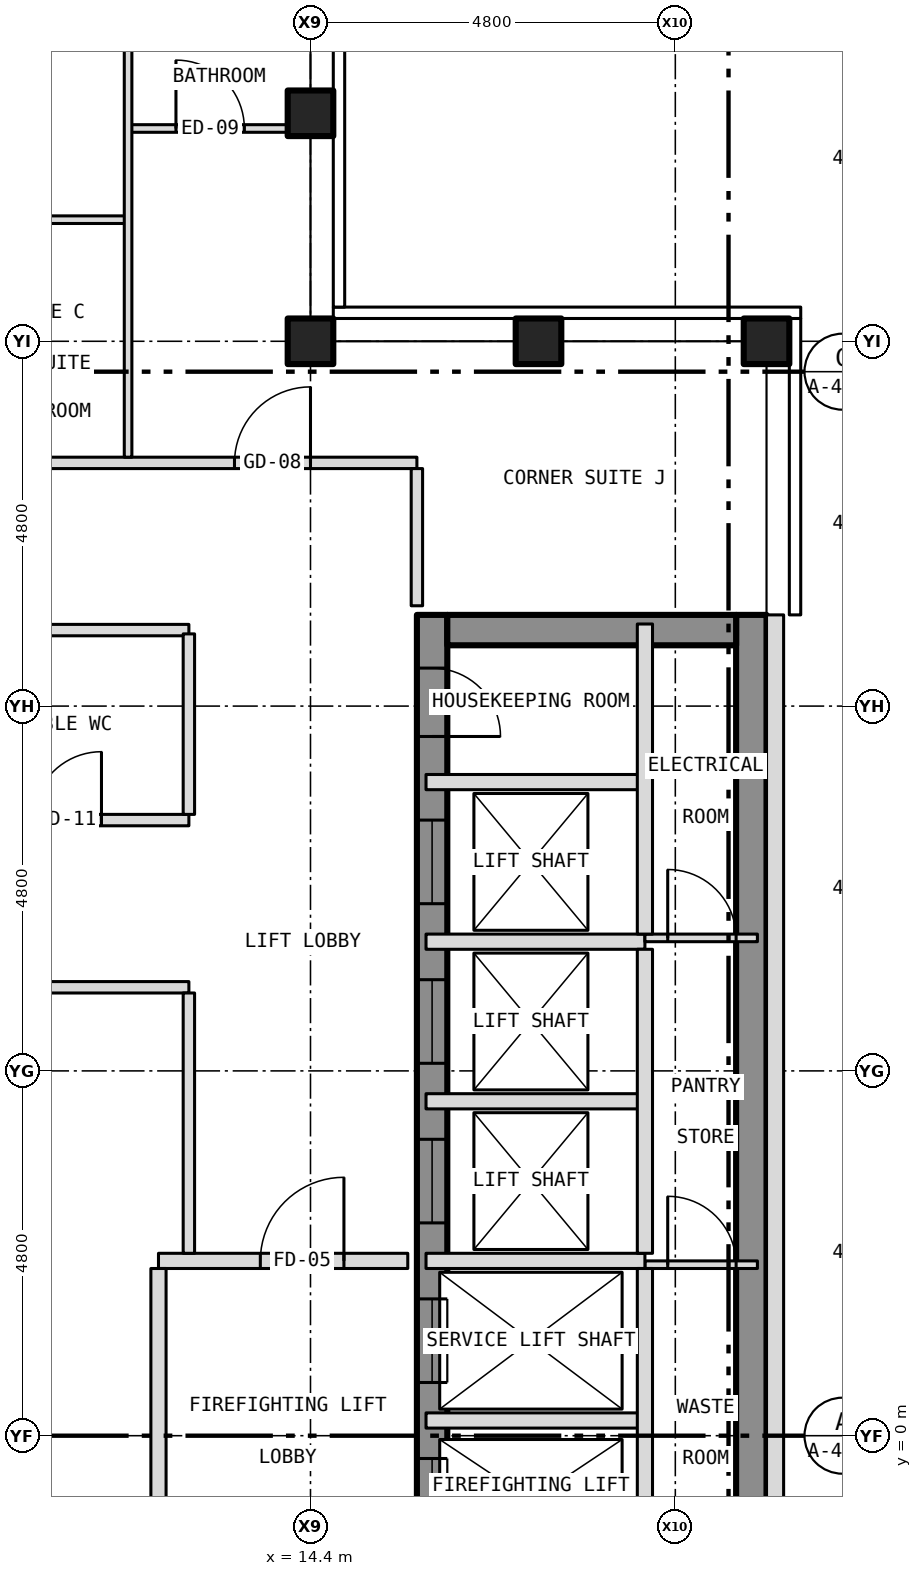
"""IFC4 building model, lengths in metres.
Left out: names, types, materials, properties, quantities, classifications, styles, units other than length and angle.
Written with IfcOpenShell. Run it as: python <this file> out.ifc"""

import sys

from ifc_helpers import new_model, si_unit, direction, frame, frame_2d, origin, origin_2d, place, context, subcontext, project, spatial, rectangle, hollow_rectangle, extrude, element, fill, save


model = new_model("IFC4")
c1 = context("Model", 3, precision=1e-05, world=origin(), true_north=direction((0.0, 1.0)))
c2 = subcontext(c1, "Body", "Model", "MODEL_VIEW")
j1 = project(units=[si_unit("LENGTHUNIT", "METRE"), si_unit("PLANEANGLEUNIT", "RADIAN")], contexts=[c1])
p1 = place(None, origin())
s1 = spatial("IfcSite", under=j1, at=p1, CompositionType="ELEMENT")
p2 = place(p1, origin())
s2 = spatial("IfcBuilding", under=s1, at=p2, CompositionType="ELEMENT")
p3 = place(p2, frame((0.0, 0.0, 251.5)))
s3 = spatial("IfcBuildingStorey", under=s2, at=p3, CompositionType="ELEMENT", Elevation=251.5)
for number, where, z_axis, x_axis in (
    (1, (20.4, 14.4, -0.15), (0.0, 0.0, 1.0), (1.0, 0.0, 0.0)),
    (2, (14.4, 14.4, -0.15), (0.0, 0.0, 1.0), (1.0, 0.0, 0.0)),
    (3, (14.4, 17.4, -0.15), (0.0, 0.0, 1.0), (1.0, 0.0, 0.0)),
    (4, (17.4, 14.4, -0.15), (0.0, 0.0, 1.0), (1.0, 0.0, 0.0)),
):
    element("IfcColumn", number, at=place(p3, frame(where, z_axis=z_axis, x_axis=x_axis)), inside=s3, PredefinedType="COLUMN", context=c2, shape_type="SweptSolid", body=[
        extrude(hollow_rectangle(XDim=0.6, YDim=0.6, WallThickness=0.03, at=origin_2d()), origin(), (0.0, 0.0, 1.0), 3.5),
    ])
p4 = place(p3, frame((16.0, -10.8, 0.0), z_axis=(0.0, 0.0, 1.0), x_axis=(0.0, 1.0, 0.0)))
e5 = element("IfcWall", 5, at=p4, inside=s3, PredefinedType="SHEAR", context=c2, shape_type="SweptSolid", body=[
    extrude(rectangle(XDim=21.6, YDim=0.4, at=frame_2d((10.8, 0.0))), origin(), (0.0, 0.0, 1.0), 3.25),
])
p5 = place(p4, frame((9.4, 0.0, 0.0)))
e6 = element("IfcOpeningElement", 6, at=p5, cuts=e5, PredefinedType="OPENING", context=c2, shape_type="SweptSolid", body=[
    extrude(rectangle(XDim=1.1, YDim=2.1, at=frame_2d((0.55, 1.05))), frame((0.0, 0.212, 0.0), z_axis=(0.0, -1.0, 0.0), x_axis=(1.0, 0.0, 0.0)), (0.0, 0.0, 1.0), 0.424),
])
p6 = place(p4, frame((11.5, 0.0, 0.0)))
e7 = element("IfcOpeningElement", 7, at=p6, cuts=e5, PredefinedType="OPENING", context=c2, shape_type="SweptSolid", body=[
    extrude(rectangle(XDim=1.1, YDim=2.1, at=frame_2d((0.55, 1.05))), frame((0.0, 0.212, 0.0), z_axis=(0.0, -1.0, 0.0), x_axis=(1.0, 0.0, 0.0)), (0.0, 0.0, 1.0), 0.424),
])
p7 = place(p4, frame((13.6, 0.0, 0.0)))
e8 = element("IfcOpeningElement", 8, at=p7, cuts=e5, PredefinedType="OPENING", context=c2, shape_type="SweptSolid", body=[
    extrude(rectangle(XDim=1.1, YDim=2.1, at=frame_2d((0.55, 1.05))), frame((0.0, 0.212, 0.0), z_axis=(0.0, -1.0, 0.0), x_axis=(1.0, 0.0, 0.0)), (0.0, 0.0, 1.0), 0.424),
])
p8 = place(p4, frame((15.7, 0.0, 0.0)))
e9 = element("IfcOpeningElement", 9, at=p8, cuts=e5, PredefinedType="OPENING", context=c2, shape_type="SweptSolid", body=[
    extrude(rectangle(XDim=1.1, YDim=2.1, at=frame_2d((0.55, 1.05))), frame((0.0, 0.212, 0.0), z_axis=(0.0, -1.0, 0.0), x_axis=(1.0, 0.0, 0.0)), (0.0, 0.0, 1.0), 0.424),
])
p9 = place(p4, frame((17.8, 0.0, 0.0)))
e10 = element("IfcOpeningElement", 10, at=p9, cuts=e5, PredefinedType="OPENING", context=c2, shape_type="SweptSolid", body=[
    extrude(rectangle(XDim=1.1, YDim=2.1, at=frame_2d((0.55, 1.05))), frame((0.0, 0.212, 0.0), z_axis=(0.0, -1.0, 0.0), x_axis=(1.0, 0.0, 0.0)), (0.0, 0.0, 1.0), 0.424),
])
p10 = place(p4, frame((5.642, 0.0, 0.0)))
e11 = element("IfcOpeningElement", 11, at=p10, cuts=e5, PredefinedType="OPENING", context=c2, shape_type="SweptSolid", body=[
    extrude(rectangle(XDim=1.1, YDim=2.1, at=frame_2d((0.55, 1.05))), frame((0.0, 0.212, 0.0), z_axis=(0.0, -1.0, 0.0), x_axis=(1.0, 0.0, 0.0)), (0.0, 0.0, 1.0), 0.424),
])
p11 = place(p4, frame((7.5, 0.0, 0.0)))
e12 = element("IfcOpeningElement", 12, at=p11, cuts=e5, PredefinedType="OPENING", context=c2, shape_type="SweptSolid", body=[
    extrude(rectangle(XDim=1.1, YDim=2.1, at=frame_2d((0.55, 1.05))), frame((0.0, 0.212, 0.0), z_axis=(0.0, -1.0, 0.0), x_axis=(1.0, 0.0, 0.0)), (0.0, 0.0, 1.0), 0.424),
])
p12 = place(p4, frame((20.0, 0.0, 0.0)))
e13 = element("IfcOpeningElement", 13, at=p12, cuts=e5, PredefinedType="OPENING", context=c2, shape_type="SweptSolid", body=[
    extrude(rectangle(XDim=0.9, YDim=2.1, at=frame_2d((0.45, 1.05))), frame((0.0, 0.212, 0.0), z_axis=(0.0, -1.0, 0.0), x_axis=(1.0, 0.0, 0.0)), (0.0, 0.0, 1.0), 0.424),
])
p13 = place(p3, frame((20.2, -10.8, 0.0), z_axis=(0.0, 0.0, 1.0), x_axis=(0.0, 1.0, 0.0)))
e14 = element("IfcWall", 14, at=p13, inside=s3, PredefinedType="SHEAR", context=c2, shape_type="SweptSolid", body=[
    extrude(rectangle(XDim=21.6, YDim=0.4, at=frame_2d((10.8, 0.0))), origin(), (0.0, 0.0, 1.0), 3.25),
])
p14 = place(p3, frame((16.2, 10.6, 0.0), z_axis=(0.0, 0.0, 1.0), x_axis=(1.0, 0.0, 0.0)))
e15 = element("IfcWall", 15, at=p14, inside=s3, PredefinedType="SHEAR", context=c2, shape_type="SweptSolid", body=[
    extrude(rectangle(XDim=3.8, YDim=0.4, at=frame_2d((1.9, 0.0))), origin(), (0.0, 0.0, 1.0), 3.25),
])
p15 = place(p3, frame((20.512, -10.8, 0.0), z_axis=(0.0, 0.0, 1.0), x_axis=(0.0, 1.0, 0.0)))
e16 = element("IfcWall", 16, at=p15, inside=s3, PredefinedType="SOLIDWALL", context=c2, shape_type="SweptSolid", body=[
    extrude(rectangle(XDim=21.6, YDim=0.225, at=frame_2d((10.8, 0.0))), origin(), (0.0, 0.0, 1.0), 3.5),
])
p16 = place(p15, frame((2.95, 0.0, 1.0)))
e17 = element("IfcOpeningElement", 17, at=p16, cuts=e16, PredefinedType="OPENING", context=c2, shape_type="SweptSolid", body=[
    extrude(rectangle(XDim=0.6, YDim=1.5, at=frame_2d((0.3, 0.75))), frame((0.0, 0.125, 0.0), z_axis=(0.0, -1.0, 0.0), x_axis=(1.0, 0.0, 0.0)), (0.0, 0.0, 1.0), 0.249),
])
p17 = place(p3, frame((15.92, 0.2, 0.0), z_axis=(0.0, 0.0, 1.0), x_axis=(1.0, 0.0, 0.0)))
e18 = element("IfcWall", 18, at=p17, inside=s3, PredefinedType="PARTITIONING", context=c2, shape_type="SweptSolid", body=[
    extrude(rectangle(XDim=2.88, YDim=0.2, at=frame_2d((1.44, 0.0))), origin(), (0.0, 0.0, 1.0), 3.25),
])
p18 = place(p3, frame((18.8, 2.25, 0.0), z_axis=(0.0, 0.0, 1.0), x_axis=(1.0, 0.0, 0.0)))
e19 = element("IfcWall", 19, at=p18, inside=s3, PredefinedType="PARTITIONING", context=c2, shape_type="SweptSolid", body=[
    extrude(rectangle(XDim=1.48, YDim=0.1, at=frame_2d((0.74, 0.0))), origin(), (0.0, 0.0, 1.0), 3.25),
])
p19 = place(p18, frame((0.3, 0.0, 0.0)))
e20 = element("IfcOpeningElement", 20, at=p19, cuts=e19, PredefinedType="OPENING", context=c2, shape_type="SweptSolid", body=[
    extrude(rectangle(XDim=0.9, YDim=2.1, at=frame_2d((0.45, 1.05))), frame((0.0, 0.062, 0.0), z_axis=(0.0, -1.0, 0.0), x_axis=(1.0, 0.0, 0.0)), (0.0, 0.0, 1.0), 0.124),
])
p20 = place(p3, frame((12.4, 2.3, 0.0), z_axis=(0.0, 0.0, 1.0), x_axis=(1.0, 0.0, 0.0)))
e21 = element("IfcWall", 21, at=p20, inside=s3, PredefinedType="PARTITIONING", context=c2, shape_type="SweptSolid", body=[
    extrude(rectangle(XDim=3.28, YDim=0.2, at=frame_2d((1.64, 0.0))), origin(), (0.0, 0.0, 1.0), 3.35),
])
p21 = place(p20, frame((1.34, 0.0, 0.0)))
e22 = element("IfcOpeningElement", 22, at=p21, cuts=e21, PredefinedType="OPENING", context=c2, shape_type="SweptSolid", body=[
    extrude(rectangle(XDim=1.1, YDim=2.1, at=frame_2d((0.55, 1.05))), frame((0.0, 0.112, 0.0), z_axis=(0.0, -1.0, 0.0), x_axis=(1.0, 0.0, 0.0)), (0.0, 0.0, 1.0), 0.224),
])
for number, where, z_axis, x_axis in (
    (23, (15.92, 2.3, 0.0), (0.0, 0.0, 1.0), (1.0, 0.0, 0.0)),
    (24, (15.92, 4.4, 0.0), (0.0, 0.0, 1.0), (1.0, 0.0, 0.0)),
):
    element("IfcWall", number, at=place(p3, frame(where, z_axis=z_axis, x_axis=x_axis)), inside=s3, PredefinedType="PARTITIONING", context=c2, shape_type="SweptSolid", body=[
        extrude(rectangle(XDim=2.88, YDim=0.2, at=frame_2d((1.44, 0.0))), origin(), (0.0, 0.0, 1.0), 3.25),
    ])
p22 = place(p3, frame((4.8, 5.9, 0.0), z_axis=(0.0, 0.0, 1.0), x_axis=(1.0, 0.0, 0.0)))
e25 = element("IfcWall", 25, at=p22, inside=s3, PredefinedType="PARTITIONING", context=c2, shape_type="SweptSolid", body=[
    extrude(rectangle(XDim=8.0, YDim=0.15, at=frame_2d((4.0, 0.0))), origin(), (0.0, 0.0, 1.0), 3.35),
])
p23 = place(p3, frame((15.92, 6.5, 0.0), z_axis=(0.0, 0.0, 1.0), x_axis=(1.0, 0.0, 0.0)))
e26 = element("IfcWall", 26, at=p23, inside=s3, PredefinedType="PARTITIONING", context=c2, shape_type="SweptSolid", body=[
    extrude(rectangle(XDim=2.88, YDim=0.2, at=frame_2d((1.44, 0.0))), origin(), (0.0, 0.0, 1.0), 3.25),
])
p24 = place(p3, frame((18.8, 6.55, 0.0), z_axis=(0.0, 0.0, 1.0), x_axis=(1.0, 0.0, 0.0)))
e27 = element("IfcWall", 27, at=p24, inside=s3, PredefinedType="PARTITIONING", context=c2, shape_type="SweptSolid", body=[
    extrude(rectangle(XDim=1.48, YDim=0.1, at=frame_2d((0.74, 0.0))), origin(), (0.0, 0.0, 1.0), 3.25),
])
p25 = place(p24, frame((0.3, 0.0, 0.0)))
e28 = element("IfcOpeningElement", 28, at=p25, cuts=e27, PredefinedType="OPENING", context=c2, shape_type="SweptSolid", body=[
    extrude(rectangle(XDim=0.9, YDim=2.1, at=frame_2d((0.45, 1.05))), frame((0.0, 0.062, 0.0), z_axis=(0.0, -1.0, 0.0), x_axis=(1.0, 0.0, 0.0)), (0.0, 0.0, 1.0), 0.124),
])
p26 = place(p3, frame((4.8, 8.1, 0.0), z_axis=(0.0, 0.0, 1.0), x_axis=(1.0, 0.0, 0.0)))
e29 = element("IfcWall", 29, at=p26, inside=s3, PredefinedType="PARTITIONING", context=c2, shape_type="SweptSolid", body=[
    extrude(rectangle(XDim=8.0, YDim=0.15, at=frame_2d((4.0, 0.0))), origin(), (0.0, 0.0, 1.0), 3.35),
])
p27 = place(p26, frame((5.95, 0.0, 0.0)))
e30 = element("IfcOpeningElement", 30, at=p27, cuts=e29, PredefinedType="OPENING", context=c2, shape_type="SweptSolid", body=[
    extrude(rectangle(XDim=0.9, YDim=2.1, at=frame_2d((0.45, 1.05))), frame((0.0, 0.087, 0.0), z_axis=(0.0, -1.0, 0.0), x_axis=(1.0, 0.0, 0.0)), (0.0, 0.0, 1.0), 0.174),
])
p28 = place(p3, frame((15.92, 8.6, 0.0), z_axis=(0.0, 0.0, 1.0), x_axis=(1.0, 0.0, 0.0)))
e31 = element("IfcWall", 31, at=p28, inside=s3, PredefinedType="PARTITIONING", context=c2, shape_type="SweptSolid", body=[
    extrude(rectangle(XDim=2.88, YDim=0.2, at=frame_2d((1.44, 0.0))), origin(), (0.0, 0.0, 1.0), 3.25),
])
p29 = place(p3, frame((4.8, 10.6, 0.0), z_axis=(0.0, 0.0, 1.0), x_axis=(1.0, 0.0, 0.0)))
e32 = element("IfcWall", 32, at=p29, inside=s3, PredefinedType="PARTITIONING", context=c2, shape_type="SweptSolid", body=[
    extrude(rectangle(XDim=8.0, YDim=0.15, at=frame_2d((4.0, 0.0))), origin(), (0.0, 0.0, 1.0), 3.35),
])
p30 = place(p29, frame((1.55, 0.0, 0.0)))
e33 = element("IfcOpeningElement", 33, at=p30, cuts=e32, PredefinedType="OPENING", context=c2, shape_type="SweptSolid", body=[
    extrude(rectangle(XDim=0.9, YDim=2.1, at=frame_2d((0.45, 1.05))), frame((0.0, 0.087, 0.0), z_axis=(0.0, -1.0, 0.0), x_axis=(1.0, 0.0, 0.0)), (0.0, 0.0, 1.0), 0.174),
])
p31 = place(p3, frame((-15.8, 12.8, 0.0), z_axis=(0.0, 0.0, 1.0), x_axis=(1.0, 0.0, 0.0)))
e34 = element("IfcWall", 34, at=p31, inside=s3, PredefinedType="PARTITIONING", context=c2, shape_type="SweptSolid", body=[
    extrude(rectangle(XDim=31.6, YDim=0.15, at=frame_2d((15.8, 0.0))), origin(), (0.0, 0.0, 1.0), 3.35),
])
p32 = place(p31, frame((4.6, 0.0, 0.0)))
e35 = element("IfcOpeningElement", 35, at=p32, cuts=e34, PredefinedType="OPENING", context=c2, shape_type="SweptSolid", body=[
    extrude(rectangle(XDim=1.0, YDim=2.1, at=frame_2d((0.5, 1.05))), frame((0.0, 0.087, 0.0), z_axis=(0.0, -1.0, 0.0), x_axis=(1.0, 0.0, 0.0)), (0.0, 0.0, 1.0), 0.174),
])
p33 = place(p31, frame((10.26, 0.0, 0.0)))
e36 = element("IfcOpeningElement", 36, at=p33, cuts=e34, PredefinedType="OPENING", context=c2, shape_type="SweptSolid", body=[
    extrude(rectangle(XDim=1.0, YDim=2.1, at=frame_2d((0.5, 1.05))), frame((0.0, 0.087, 0.0), z_axis=(0.0, -1.0, 0.0), x_axis=(1.0, 0.0, 0.0)), (0.0, 0.0, 1.0), 0.174),
])
p34 = place(p31, frame((19.86, 0.0, 0.0)))
e37 = element("IfcOpeningElement", 37, at=p34, cuts=e34, PredefinedType="OPENING", context=c2, shape_type="SweptSolid", body=[
    extrude(rectangle(XDim=1.0, YDim=2.1, at=frame_2d((0.5, 1.05))), frame((0.0, 0.087, 0.0), z_axis=(0.0, -1.0, 0.0), x_axis=(1.0, 0.0, 0.0)), (0.0, 0.0, 1.0), 0.174),
])
p35 = place(p31, frame((1.4, 0.0, 0.0)))
e38 = element("IfcOpeningElement", 38, at=p35, cuts=e34, PredefinedType="OPENING", context=c2, shape_type="SweptSolid", body=[
    extrude(rectangle(XDim=1.0, YDim=2.1, at=frame_2d((0.5, 1.05))), frame((0.0, 0.087, 0.0), z_axis=(0.0, -1.0, 0.0), x_axis=(1.0, 0.0, 0.0)), (0.0, 0.0, 1.0), 0.174),
])
p36 = place(p31, frame((29.2, 0.0, 0.0)))
e39 = element("IfcOpeningElement", 39, at=p36, cuts=e34, PredefinedType="OPENING", context=c2, shape_type="SweptSolid", body=[
    extrude(rectangle(XDim=1.0, YDim=2.1, at=frame_2d((0.5, 1.05))), frame((0.0, 0.087, 0.0), z_axis=(0.0, -1.0, 0.0), x_axis=(1.0, 0.0, 0.0)), (0.0, 0.0, 1.0), 0.174),
])
p37 = place(p3, frame((9.8, 16.0, 0.0), z_axis=(0.0, 0.0, 1.0), x_axis=(1.0, 0.0, 0.0)))
e40 = element("IfcWall", 40, at=p37, inside=s3, PredefinedType="PARTITIONING", context=c2, shape_type="SweptSolid", body=[
    extrude(rectangle(XDim=2.2, YDim=0.1, at=frame_2d((1.1, 0.0))), origin(), (0.0, 0.0, 1.0), 3.35),
])
p38 = place(p3, frame((12.0, 17.2, 0.0), z_axis=(0.0, 0.0, 1.0), x_axis=(1.0, 0.0, 0.0)))
e41 = element("IfcWall", 41, at=p38, inside=s3, PredefinedType="PARTITIONING", context=c2, shape_type="SweptSolid", body=[
    extrude(rectangle(XDim=2.28, YDim=0.1, at=frame_2d((1.14, 0.0))), origin(), (0.0, 0.0, 1.0), 3.35),
])
p39 = place(p38, frame((0.63, 0.0, 0.0)))
e42 = element("IfcOpeningElement", 42, at=p39, cuts=e41, PredefinedType="OPENING", context=c2, shape_type="SweptSolid", body=[
    extrude(rectangle(XDim=0.9, YDim=2.1, at=frame_2d((0.45, 1.05))), frame((0.0, 0.062, 0.0), z_axis=(0.0, -1.0, 0.0), x_axis=(1.0, 0.0, 0.0)), (0.0, 0.0, 1.0), 0.124),
])
p40 = place(p3, frame((12.0, 12.875, 0.0), z_axis=(0.0, 0.0, 1.0), x_axis=(0.0, 1.0, 0.0)))
e43 = element("IfcWall", 43, at=p40, inside=s3, PredefinedType="PARTITIONING", context=c2, shape_type="SweptSolid", body=[
    extrude(rectangle(XDim=7.855, YDim=0.1, at=frame_2d((3.927, 0.0))), origin(), (0.0, 0.0, 1.0), 3.35),
])
p41 = place(p3, frame((12.4, -1.8, 0.0), z_axis=(0.0, 0.0, 1.0), x_axis=(0.0, 1.0, 0.0)))
e44 = element("IfcWall", 44, at=p41, inside=s3, PredefinedType="PARTITIONING", context=c2, shape_type="SweptSolid", body=[
    extrude(rectangle(XDim=4.0, YDim=0.2, at=frame_2d((2.0, 0.0))), origin(), (0.0, 0.0, 1.0), 3.35),
])
p42 = place(p3, frame((12.8, 2.4, 0.0), z_axis=(0.0, 0.0, 1.0), x_axis=(0.0, 1.0, 0.0)))
e45 = element("IfcWall", 45, at=p42, inside=s3, PredefinedType="PARTITIONING", context=c2, shape_type="SweptSolid", body=[
    extrude(rectangle(XDim=3.425, YDim=0.15, at=frame_2d((1.712, 0.0))), origin(), (0.0, 0.0, 1.0), 3.35),
])
p43 = place(p3, frame((12.8, 8.175, 0.0), z_axis=(0.0, 0.0, 1.0), x_axis=(0.0, 1.0, 0.0)))
e46 = element("IfcWall", 46, at=p43, inside=s3, PredefinedType="PARTITIONING", context=c2, shape_type="SweptSolid", body=[
    extrude(rectangle(XDim=2.375, YDim=0.15, at=frame_2d((1.188, 0.0))), origin(), (0.0, 0.0, 1.0), 3.35),
])
p44 = place(p3, frame((15.8, 10.92, 0.0), z_axis=(0.0, 0.0, 1.0), x_axis=(0.0, 1.0, 0.0)))
e47 = element("IfcWall", 47, at=p44, inside=s3, PredefinedType="PARTITIONING", context=c2, shape_type="SweptSolid", body=[
    extrude(rectangle(XDim=1.805, YDim=0.15, at=frame_2d((0.903, 0.0))), origin(), (0.0, 0.0, 1.0), 3.35),
])
for number, where, z_axis, x_axis in (
    (48, (18.8, -1.8, 0.0), (0.0, 0.0, 1.0), (0.0, 1.0, 0.0)),
    (49, (18.8, 2.4, 0.0), (0.0, 0.0, 1.0), (0.0, 1.0, 0.0)),
):
    element("IfcWall", number, at=place(p3, frame(where, z_axis=z_axis, x_axis=x_axis)), inside=s3, PredefinedType="PARTITIONING", context=c2, shape_type="SweptSolid", body=[
        extrude(rectangle(XDim=4.0, YDim=0.2, at=frame_2d((2.0, 0.0))), origin(), (0.0, 0.0, 1.0), 3.25),
    ])
p45 = place(p3, frame((18.8, 6.6, 0.0), z_axis=(0.0, 0.0, 1.0), x_axis=(0.0, 1.0, 0.0)))
e50 = element("IfcWall", 50, at=p45, inside=s3, PredefinedType="PARTITIONING", context=c2, shape_type="SweptSolid", body=[
    extrude(rectangle(XDim=4.08, YDim=0.2, at=frame_2d((2.04, 0.0))), origin(), (0.0, 0.0, 1.0), 3.25),
])
p46 = place(p5, origin())
e51 = element("IfcDoor", 51, at=p46, inside=s3, OperationType="SLIDING_TO_LEFT", PredefinedType="DOOR", context=c2, shape_type="SweptSolid", body=[
    extrude(rectangle(XDim=1.1, YDim=2.1, at=frame_2d((0.55, 1.05))), frame((0.0, 0.025, 0.0), z_axis=(0.0, -1.0, 0.0), x_axis=(1.0, 0.0, 0.0)), (0.0, 0.0, 1.0), 0.05),
])
fill(e6, e51)
p47 = place(p6, origin())
e52 = element("IfcDoor", 52, at=p47, inside=s3, OperationType="SLIDING_TO_LEFT", PredefinedType="DOOR", context=c2, shape_type="SweptSolid", body=[
    extrude(rectangle(XDim=1.1, YDim=2.1, at=frame_2d((0.55, 1.05))), frame((0.0, 0.025, 0.0), z_axis=(0.0, -1.0, 0.0), x_axis=(1.0, 0.0, 0.0)), (0.0, 0.0, 1.0), 0.05),
])
fill(e7, e52)
p48 = place(p7, origin())
e53 = element("IfcDoor", 53, at=p48, inside=s3, OperationType="SLIDING_TO_LEFT", PredefinedType="DOOR", context=c2, shape_type="SweptSolid", body=[
    extrude(rectangle(XDim=1.1, YDim=2.1, at=frame_2d((0.55, 1.05))), frame((0.0, 0.025, 0.0), z_axis=(0.0, -1.0, 0.0), x_axis=(1.0, 0.0, 0.0)), (0.0, 0.0, 1.0), 0.05),
])
fill(e8, e53)
p49 = place(p8, origin())
e54 = element("IfcDoor", 54, at=p49, inside=s3, OperationType="SLIDING_TO_LEFT", PredefinedType="DOOR", context=c2, shape_type="SweptSolid", body=[
    extrude(rectangle(XDim=1.1, YDim=2.1, at=frame_2d((0.55, 1.05))), frame((0.0, 0.025, 0.0), z_axis=(0.0, -1.0, 0.0), x_axis=(1.0, 0.0, 0.0)), (0.0, 0.0, 1.0), 0.05),
])
fill(e9, e54)
p50 = place(p9, origin())
e55 = element("IfcDoor", 55, at=p50, inside=s3, OperationType="SLIDING_TO_LEFT", PredefinedType="DOOR", context=c2, shape_type="SweptSolid", body=[
    extrude(rectangle(XDim=1.1, YDim=2.1, at=frame_2d((0.55, 1.05))), frame((0.0, 0.025, 0.0), z_axis=(0.0, -1.0, 0.0), x_axis=(1.0, 0.0, 0.0)), (0.0, 0.0, 1.0), 0.05),
])
fill(e10, e55)
p51 = place(p12, origin())
e56 = element("IfcDoor", 56, at=p51, inside=s3, OperationType="SINGLE_SWING_LEFT", PredefinedType="DOOR", context=c2, shape_type="SweptSolid", body=[
    extrude(rectangle(XDim=0.9, YDim=2.1, at=frame_2d((0.45, 1.05))), frame((0.0, 0.025, 0.0), z_axis=(0.0, -1.0, 0.0), x_axis=(1.0, 0.0, 0.0)), (0.0, 0.0, 1.0), 0.05),
])
fill(e13, e56)
p52 = place(p19, origin())
e57 = element("IfcDoor", 57, at=p52, inside=s3, OperationType="SINGLE_SWING_LEFT", PredefinedType="DOOR", context=c2, shape_type="SweptSolid", body=[
    extrude(rectangle(XDim=0.9, YDim=2.1, at=frame_2d((0.45, 1.05))), frame((0.0, 0.025, 0.0), z_axis=(0.0, -1.0, 0.0), x_axis=(1.0, 0.0, 0.0)), (0.0, 0.0, 1.0), 0.05),
])
fill(e20, e57)
p53 = place(p25, origin())
e58 = element("IfcDoor", 58, at=p53, inside=s3, OperationType="SINGLE_SWING_LEFT", PredefinedType="DOOR", context=c2, shape_type="SweptSolid", body=[
    extrude(rectangle(XDim=0.9, YDim=2.1, at=frame_2d((0.45, 1.05))), frame((0.0, 0.025, 0.0), z_axis=(0.0, -1.0, 0.0), x_axis=(1.0, 0.0, 0.0)), (0.0, 0.0, 1.0), 0.05),
])
fill(e28, e58)
p54 = place(p21, origin())
e59 = element("IfcDoor", 59, at=p54, inside=s3, OperationType="SINGLE_SWING_RIGHT", PredefinedType="DOOR", context=c2, shape_type="SweptSolid", body=[
    extrude(rectangle(XDim=1.1, YDim=2.1, at=frame_2d((0.55, 1.05))), frame((0.0, 0.025, 0.0), z_axis=(0.0, -1.0, 0.0), x_axis=(1.0, 0.0, 0.0)), (0.0, 0.0, 1.0), 0.05),
])
fill(e22, e59)
p55 = place(p39, origin())
e60 = element("IfcDoor", 60, at=p55, inside=s3, OperationType="SINGLE_SWING_LEFT", PredefinedType="DOOR", context=c2, shape_type="SweptSolid", body=[
    extrude(rectangle(XDim=0.9, YDim=2.1, at=frame_2d((0.45, 1.05))), frame((0.0, 0.025, 0.0), z_axis=(0.0, -1.0, 0.0), x_axis=(1.0, 0.0, 0.0)), (0.0, 0.0, 1.0), 0.05),
])
fill(e42, e60)
p56 = place(p36, origin())
e61 = element("IfcDoor", 61, at=p56, inside=s3, OperationType="SINGLE_SWING_RIGHT", PredefinedType="DOOR", context=c2, shape_type="SweptSolid", body=[
    extrude(rectangle(XDim=1.0, YDim=2.1, at=frame_2d((0.5, 1.05))), frame((0.0, 0.025, 0.0), z_axis=(0.0, -1.0, 0.0), x_axis=(1.0, 0.0, 0.0)), (0.0, 0.0, 1.0), 0.05),
])
fill(e39, e61)
p57 = place(p27, origin())
e62 = element("IfcDoor", 62, at=p57, inside=s3, OperationType="SINGLE_SWING_RIGHT", PredefinedType="DOOR", context=c2, shape_type="SweptSolid", body=[
    extrude(rectangle(XDim=0.9, YDim=2.1, at=frame_2d((0.45, 1.05))), frame((0.0, 0.025, 0.0), z_axis=(0.0, -1.0, 0.0), x_axis=(1.0, 0.0, 0.0)), (0.0, 0.0, 1.0), 0.05),
])
fill(e30, e62)
save(model, sys.argv[1])
